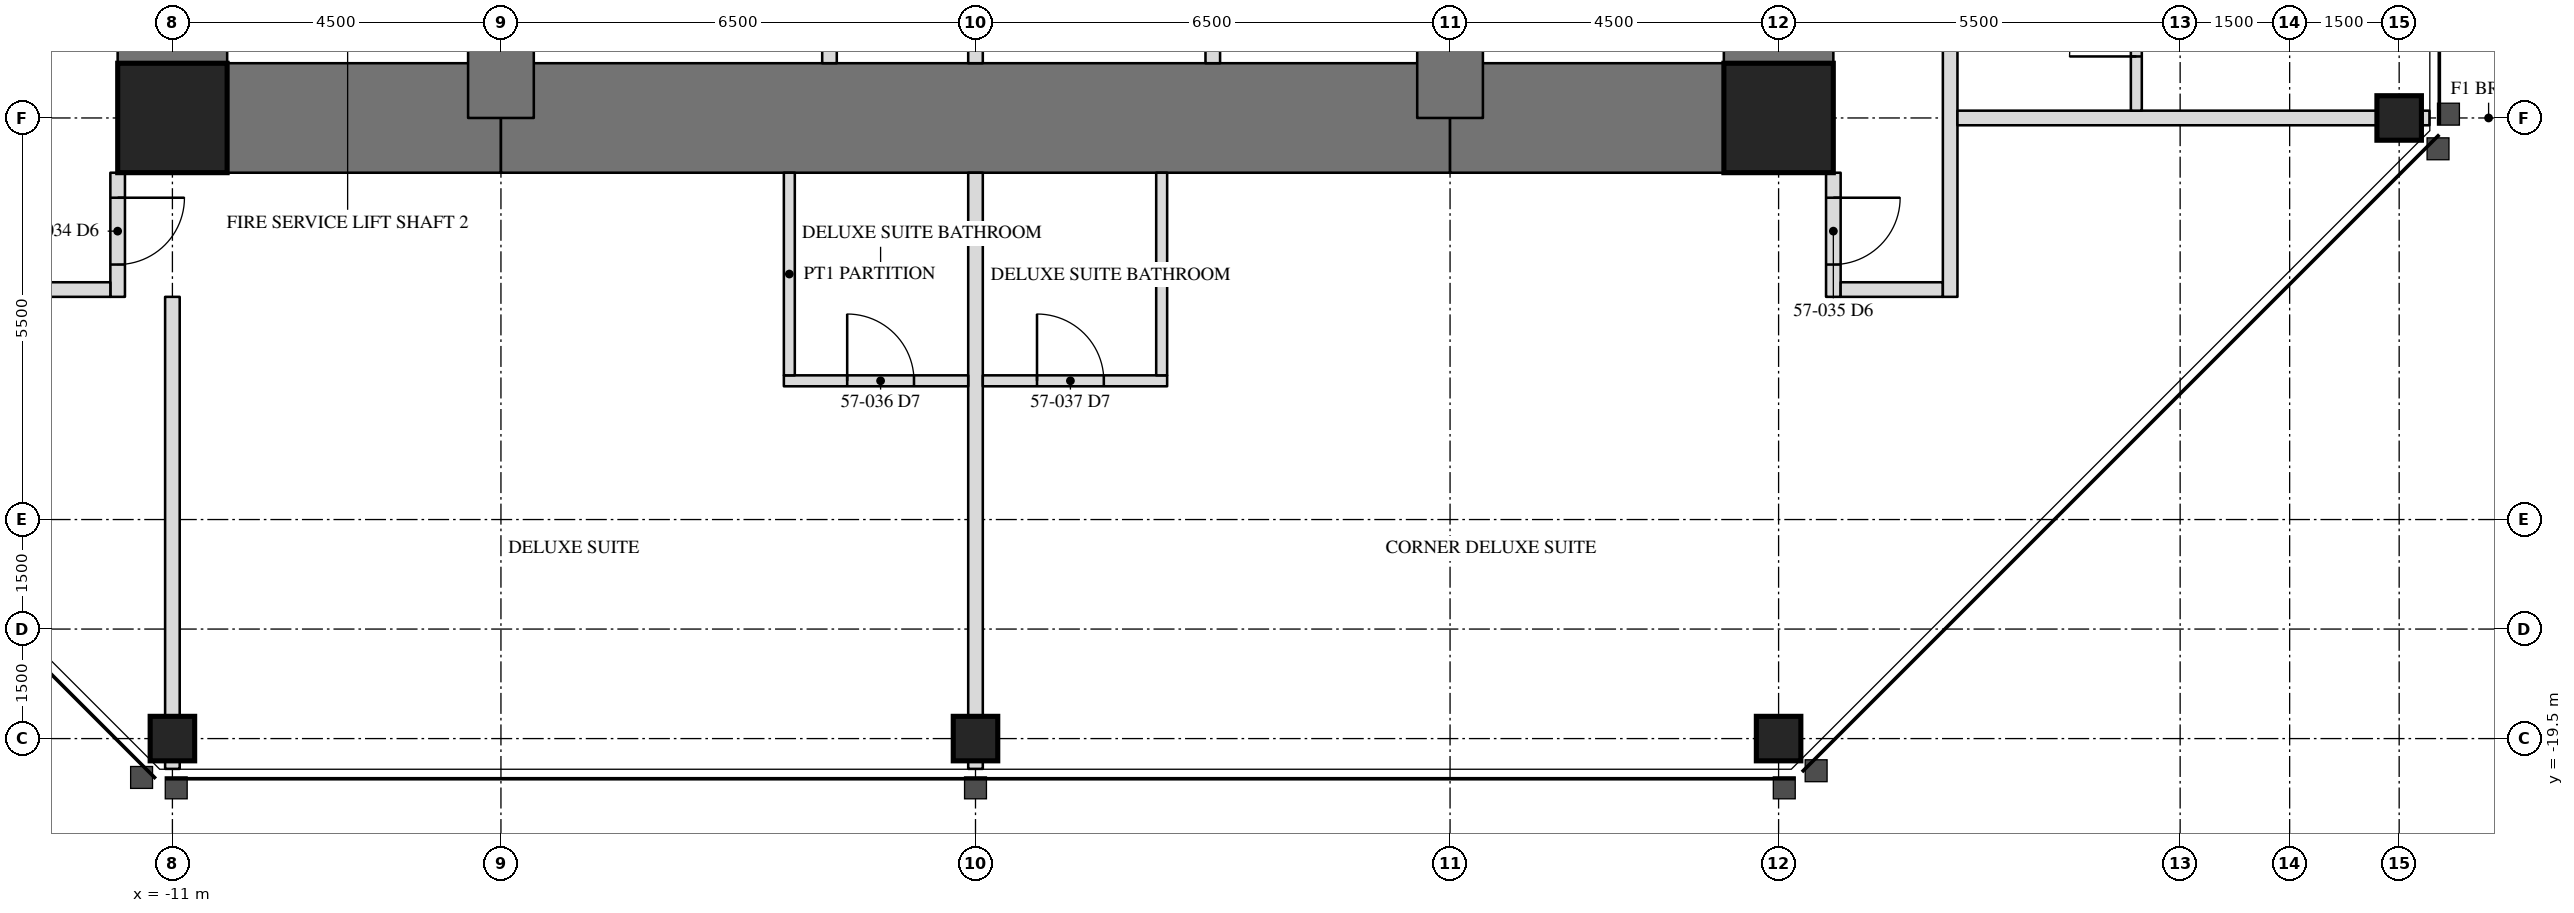
"""IFC4 building model, lengths in metres.
Left out: names, types, materials, properties, quantities, classifications, styles, units other than length and angle.
Written with IfcOpenShell. Run it as: python <this file> out.ifc"""

import sys

from ifc_helpers import new_model, si_unit, direction, frame, frame_2d, origin, origin_2d, place, context, subcontext, project, spatial, rectangle, hollow_rectangle, extrude, element, fill, save


model = new_model("IFC4")
c1 = context("Model", 3, precision=1e-05, world=origin(), true_north=direction((0.0, 1.0)))
c2 = subcontext(c1, "Body", "Model", "MODEL_VIEW")
j1 = project(units=[si_unit("LENGTHUNIT", "METRE"), si_unit("PLANEANGLEUNIT", "RADIAN")], contexts=[c1])
p1 = place(None, origin())
s1 = spatial("IfcSite", under=j1, at=p1, CompositionType="ELEMENT")
p2 = place(p1, origin())
s2 = spatial("IfcBuilding", under=s1, at=p2, CompositionType="ELEMENT")
p3 = place(p2, frame((0.0, 0.0, 236.2)))
s3 = spatial("IfcBuildingStorey", under=s2, at=p3, CompositionType="ELEMENT", Elevation=236.2)
for number, where, z_axis, x_axis in (
    (1, (-11.0, -19.5, 0.0), (0.0, 0.0, 1.0), (1.0, 0.0, 0.0)),
    (2, (0.0, -19.5, 0.0), (0.0, 0.0, 1.0), (1.0, 0.0, 0.0)),
    (3, (11.0, -19.5, 0.0), (0.0, 0.0, 1.0), (1.0, 0.0, 0.0)),
    (4, (19.5, -11.0, 0.0), (0.0, 0.0, 1.0), (0.0, 1.0, 0.0)),
):
    element("IfcColumn", number, at=place(p3, frame(where, z_axis=z_axis, x_axis=x_axis)), inside=s3, PredefinedType="COLUMN", context=c2, shape_type="SweptSolid", body=[
        extrude(hollow_rectangle(XDim=0.61, YDim=0.61, WallThickness=0.051, at=origin_2d()), origin(), (0.0, 0.0, 1.0), 3.5),
    ])
p4 = place(p3, frame((11.0, -11.0, 0.0), z_axis=(0.0, 0.0, 1.0), x_axis=(0.0, 1.0, 0.0)))
e5 = element("IfcWall", 5, at=p4, inside=s3, PredefinedType="SHEAR", context=c2, shape_type="SweptSolid", body=[
    extrude(rectangle(XDim=22.0, YDim=1.5, at=frame_2d((11.0, 0.0))), origin(), (0.0, 0.0, 1.0), 3.5),
])
p5 = place(p4, frame((15.393, 0.0, 0.0)))
e6 = element("IfcOpeningElement", 6, at=p5, cuts=e5, PredefinedType="OPENING", context=c2, shape_type="SweptSolid", body=[
    extrude(rectangle(XDim=0.915, YDim=2.134, at=frame_2d((0.458, 1.067))), frame((0.0, 0.76, 0.0), z_axis=(0.0, -1.0, 0.0), x_axis=(1.0, 0.0, 0.0)), (0.0, 0.0, 1.0), 1.52),
])
p6 = place(p3, frame((-11.0, 11.0, 0.0), z_axis=(0.0, 0.0, 1.0), x_axis=(0.0, -1.0, 0.0)))
e7 = element("IfcWall", 7, at=p6, inside=s3, PredefinedType="SHEAR", context=c2, shape_type="SweptSolid", body=[
    extrude(rectangle(XDim=22.0, YDim=1.5, at=frame_2d((11.0, 0.0))), origin(), (0.0, 0.0, 1.0), 3.5),
])
p7 = place(p6, frame((15.393, 0.0, 0.0)))
e8 = element("IfcOpeningElement", 8, at=p7, cuts=e7, PredefinedType="OPENING", context=c2, shape_type="SweptSolid", body=[
    extrude(rectangle(XDim=0.915, YDim=2.134, at=frame_2d((0.458, 1.067))), frame((0.0, 0.76, 0.0), z_axis=(0.0, -1.0, 0.0), x_axis=(1.0, 0.0, 0.0)), (0.0, 0.0, 1.0), 1.52),
])
p8 = place(p3, frame((-11.0, -11.0, 0.0), z_axis=(0.0, 0.0, 1.0), x_axis=(1.0, 0.0, 0.0)))
e9 = element("IfcWall", 9, at=p8, inside=s3, PredefinedType="SHEAR", context=c2, shape_type="SweptSolid", body=[
    extrude(rectangle(XDim=4.5, YDim=1.5, at=frame_2d((2.25, 0.0))), origin(), (0.0, 0.0, 1.0), 3.5),
])
p9 = place(p3, frame((-6.5, -11.0, 0.0), z_axis=(0.0, 0.0, 1.0), x_axis=(1.0, 0.0, 0.0)))
e10 = element("IfcWall", 10, at=p9, inside=s3, PredefinedType="SHEAR", context=c2, shape_type="SweptSolid", body=[
    extrude(rectangle(XDim=13.0, YDim=1.5, at=frame_2d((6.5, 0.0))), origin(), (0.0, 0.0, 1.0), 3.5),
])
p10 = place(p3, frame((6.5, -11.0, 0.0), z_axis=(0.0, 0.0, 1.0), x_axis=(1.0, 0.0, 0.0)))
e11 = element("IfcWall", 11, at=p10, inside=s3, PredefinedType="SHEAR", context=c2, shape_type="SweptSolid", body=[
    extrude(rectangle(XDim=4.5, YDim=1.5, at=frame_2d((2.25, 0.0))), origin(), (0.0, 0.0, 1.0), 3.5),
])
for number, where, z_axis, x_axis in (
    (12, (6.5, -11.0, 0.0), (0.0, 0.0, 1.0), (0.0, 1.0, 0.0)),
    (13, (-6.5, -6.5, 0.0), (0.0, 0.0, 1.0), (0.0, -1.0, 0.0)),
):
    element("IfcWall", number, at=place(p3, frame(where, z_axis=z_axis, x_axis=x_axis)), inside=s3, PredefinedType="SHEAR", context=c2, shape_type="SweptSolid", body=[
        extrude(rectangle(XDim=4.5, YDim=0.9, at=frame_2d((2.25, 0.0))), origin(), (0.0, 0.0, 1.0), 3.5),
    ])
for number, where, z_axis, x_axis in (
    (14, (-11.0, -11.0, 0.0), (0.0, 0.0, 1.0), (1.0, 0.0, 0.0)),
    (15, (11.0, -11.0, 0.0), (0.0, 0.0, 1.0), (1.0, 0.0, 0.0)),
):
    element("IfcColumn", number, at=place(p3, frame(where, z_axis=z_axis, x_axis=x_axis)), inside=s3, PredefinedType="COLUMN", context=c2, shape_type="SweptSolid", body=[
        extrude(hollow_rectangle(XDim=1.499, YDim=1.499, WallThickness=0.102, at=origin_2d()), origin(), (0.0, 0.0, 1.0), 3.5),
    ])
for number, where, z_axis, x_axis in (
    (16, (0.0, -10.25, 0.0), (0.0, 0.0, 1.0), (0.0, 1.0, 0.0)),
    (17, (3.25, -10.25, 0.0), (0.0, 0.0, 1.0), (0.0, 1.0, 0.0)),
    (18, (-2.0, -10.25, 0.0), (0.0, 0.0, 1.0), (0.0, 1.0, 0.0)),
):
    element("IfcWall", number, at=place(p3, frame(where, z_axis=z_axis, x_axis=x_axis)), inside=s3, PredefinedType="PARTITIONING", context=c2, shape_type="SweptSolid", body=[
        extrude(rectangle(XDim=3.3, YDim=0.2, at=frame_2d((1.65, 0.0))), origin(), (0.0, 0.0, 1.0), 3.31),
    ])
p11 = place(p3, frame((-11.75, -11.75, 0.0), z_axis=(0.0, 0.0, 1.0), x_axis=(0.0, -1.0, 0.0)))
e19 = element("IfcWall", 19, at=p11, inside=s3, PredefinedType="PARTITIONING", context=c2, shape_type="SweptSolid", body=[
    extrude(rectangle(XDim=1.7, YDim=0.2, at=frame_2d((0.85, 0.0))), origin(), (0.0, 0.0, 1.0), 3.31),
])
p12 = place(p11, frame((0.343, 0.0, 0.0)))
e20 = element("IfcOpeningElement", 20, at=p12, cuts=e19, PredefinedType="OPENING", context=c2, shape_type="SweptSolid", body=[
    extrude(rectangle(XDim=0.915, YDim=2.134, at=frame_2d((0.458, 1.067))), frame((0.0, 0.11, 0.0), z_axis=(0.0, -1.0, 0.0), x_axis=(1.0, 0.0, 0.0)), (0.0, 0.0, 1.0), 0.22),
])
p13 = place(p3, frame((11.75, -11.75, 0.0), z_axis=(0.0, 0.0, 1.0), x_axis=(0.0, -1.0, 0.0)))
e21 = element("IfcWall", 21, at=p13, inside=s3, PredefinedType="PARTITIONING", context=c2, shape_type="SweptSolid", body=[
    extrude(rectangle(XDim=1.7, YDim=0.2, at=frame_2d((0.85, 0.0))), origin(), (0.0, 0.0, 1.0), 3.31),
])
p14 = place(p13, frame((0.343, 0.0, 0.0)))
e22 = element("IfcOpeningElement", 22, at=p14, cuts=e21, PredefinedType="OPENING", context=c2, shape_type="SweptSolid", body=[
    extrude(rectangle(XDim=0.915, YDim=2.134, at=frame_2d((0.458, 1.067))), frame((0.0, 0.11, 0.0), z_axis=(0.0, -1.0, 0.0), x_axis=(1.0, 0.0, 0.0)), (0.0, 0.0, 1.0), 0.22),
])
p15 = place(p3, frame((-13.45, -13.35, 0.0), z_axis=(0.0, 0.0, 1.0), x_axis=(1.0, 0.0, 0.0)))
e23 = element("IfcWall", 23, at=p15, inside=s3, PredefinedType="PARTITIONING", context=c2, shape_type="SweptSolid", body=[
    extrude(rectangle(XDim=1.6, YDim=0.2, at=frame_2d((0.8, 0.0))), origin(), (0.0, 0.0, 1.0), 3.31),
])
p16 = place(p3, frame((11.85, -13.35, 0.0), z_axis=(0.0, 0.0, 1.0), x_axis=(1.0, 0.0, 0.0)))
e24 = element("IfcWall", 24, at=p16, inside=s3, PredefinedType="PARTITIONING", context=c2, shape_type="SweptSolid", body=[
    extrude(rectangle(XDim=1.4, YDim=0.2, at=frame_2d((0.7, 0.0))), origin(), (0.0, 0.0, 1.0), 3.31),
])
p17 = place(p3, frame((13.35, -13.45, 0.0), z_axis=(0.0, 0.0, 1.0), x_axis=(0.0, 1.0, 0.0)))
e25 = element("IfcWall", 25, at=p17, inside=s3, PredefinedType="PARTITIONING", context=c2, shape_type="SweptSolid", body=[
    extrude(rectangle(XDim=27.5, YDim=0.2, at=frame_2d((13.75, 0.0))), origin(), (0.0, 0.0, 1.0), 3.31),
])
p18 = place(p17, frame((5.353, 0.0, 0.0)))
e26 = element("IfcOpeningElement", 26, at=p18, cuts=e25, PredefinedType="OPENING", context=c2, shape_type="SweptSolid", body=[
    extrude(rectangle(XDim=0.915, YDim=2.134, at=frame_2d((0.458, 1.067))), frame((0.0, 0.11, 0.0), z_axis=(0.0, -1.0, 0.0), x_axis=(1.0, 0.0, 0.0)), (0.0, 0.0, 1.0), 0.22),
])
p19 = place(p17, frame((13.577, 0.0, 0.0)))
e27 = element("IfcOpeningElement", 27, at=p19, cuts=e25, PredefinedType="OPENING", context=c2, shape_type="SweptSolid", body=[
    extrude(rectangle(XDim=0.915, YDim=2.134, at=frame_2d((0.458, 1.067))), frame((0.0, 0.11, 0.0), z_axis=(0.0, -1.0, 0.0), x_axis=(1.0, 0.0, 0.0)), (0.0, 0.0, 1.0), 0.22),
])
p20 = place(p17, frame((21.967, 0.0, 0.0)))
e28 = element("IfcOpeningElement", 28, at=p20, cuts=e25, PredefinedType="OPENING", context=c2, shape_type="SweptSolid", body=[
    extrude(rectangle(XDim=0.915, YDim=2.134, at=frame_2d((0.458, 1.067))), frame((0.0, 0.11, 0.0), z_axis=(0.0, -1.0, 0.0), x_axis=(1.0, 0.0, 0.0)), (0.0, 0.0, 1.0), 0.22),
])
p21 = place(p3, frame((13.45, -11.0, 0.0), z_axis=(0.0, 0.0, 1.0), x_axis=(1.0, 0.0, 0.0)))
e29 = element("IfcWall", 29, at=p21, inside=s3, PredefinedType="PARTITIONING", context=c2, shape_type="SweptSolid", body=[
    extrude(rectangle(XDim=6.465, YDim=0.2, at=frame_2d((3.232, 0.0))), origin(), (0.0, 0.0, 1.0), 2.802),
])
p22 = place(p3, frame((15.9, -10.9, 0.0), z_axis=(0.0, 0.0, 1.0), x_axis=(0.0, 1.0, 0.0)))
e30 = element("IfcWall", 30, at=p22, inside=s3, PredefinedType="PARTITIONING", context=c2, shape_type="SweptSolid", body=[
    extrude(rectangle(XDim=2.525, YDim=0.15, at=frame_2d((1.262, 0.0))), origin(), (0.0, 0.0, 1.0), 3.31),
])
p23 = place(p22, frame((0.742, 0.0, 0.0)))
e31 = element("IfcOpeningElement", 31, at=p23, cuts=e30, PredefinedType="OPENING", context=c2, shape_type="SweptSolid", body=[
    extrude(rectangle(XDim=0.915, YDim=2.032, at=frame_2d((0.458, 1.016))), frame((0.0, 0.085, 0.0), z_axis=(0.0, -1.0, 0.0), x_axis=(1.0, 0.0, 0.0)), (0.0, 0.0, 1.0), 0.17),
])
p24 = place(p3, frame((-11.0, -13.45, 0.0), z_axis=(0.0, 0.0, 1.0), x_axis=(0.0, -1.0, 0.0)))
e32 = element("IfcWall", 32, at=p24, inside=s3, PredefinedType="PARTITIONING", context=c2, shape_type="SweptSolid", body=[
    extrude(rectangle(XDim=6.465, YDim=0.2, at=frame_2d((3.232, 0.0))), origin(), (0.0, 0.0, 1.0), 2.802),
])
p25 = place(p3, frame((0.0, -11.75, 0.0), z_axis=(0.0, 0.0, 1.0), x_axis=(0.0, -1.0, 0.0)))
e33 = element("IfcWall", 33, at=p25, inside=s3, PredefinedType="PARTITIONING", context=c2, shape_type="SweptSolid", body=[
    extrude(rectangle(XDim=8.165, YDim=0.2, at=frame_2d((4.083, 0.0))), origin(), (0.0, 0.0, 1.0), 2.802),
])
p26 = place(p3, frame((-2.625, -14.6, 0.0), z_axis=(0.0, 0.0, 1.0), x_axis=(1.0, 0.0, 0.0)))
e34 = element("IfcWall", 34, at=p26, inside=s3, PredefinedType="PARTITIONING", context=c2, shape_type="SweptSolid", body=[
    extrude(rectangle(XDim=2.525, YDim=0.15, at=frame_2d((1.262, 0.0))), origin(), (0.0, 0.0, 1.0), 3.31),
])
p27 = place(p26, frame((0.867, 0.0, 0.0)))
e35 = element("IfcOpeningElement", 35, at=p27, cuts=e34, PredefinedType="OPENING", context=c2, shape_type="SweptSolid", body=[
    extrude(rectangle(XDim=0.915, YDim=2.032, at=frame_2d((0.458, 1.016))), frame((0.0, 0.085, 0.0), z_axis=(0.0, -1.0, 0.0), x_axis=(1.0, 0.0, 0.0)), (0.0, 0.0, 1.0), 0.17),
])
p28 = place(p3, frame((-2.55, -11.75, 0.0), z_axis=(0.0, 0.0, 1.0), x_axis=(0.0, -1.0, 0.0)))
e36 = element("IfcWall", 36, at=p28, inside=s3, PredefinedType="PARTITIONING", context=c2, shape_type="SweptSolid", body=[
    extrude(rectangle(XDim=2.775, YDim=0.15, at=frame_2d((1.387, 0.0))), origin(), (0.0, 0.0, 1.0), 3.31),
])
p29 = place(p3, frame((0.1, -14.6, 0.0), z_axis=(0.0, 0.0, 1.0), x_axis=(1.0, 0.0, 0.0)))
e37 = element("IfcWall", 37, at=p29, inside=s3, PredefinedType="PARTITIONING", context=c2, shape_type="SweptSolid", body=[
    extrude(rectangle(XDim=2.525, YDim=0.15, at=frame_2d((1.262, 0.0))), origin(), (0.0, 0.0, 1.0), 3.31),
])
p30 = place(p29, frame((0.742, 0.0, 0.0)))
e38 = element("IfcOpeningElement", 38, at=p30, cuts=e37, PredefinedType="OPENING", context=c2, shape_type="SweptSolid", body=[
    extrude(rectangle(XDim=0.915, YDim=2.032, at=frame_2d((0.458, 1.016))), frame((0.0, 0.085, 0.0), z_axis=(0.0, -1.0, 0.0), x_axis=(1.0, 0.0, 0.0)), (0.0, 0.0, 1.0), 0.17),
])
p31 = place(p3, frame((2.55, -11.75, 0.0), z_axis=(0.0, 0.0, 1.0), x_axis=(0.0, -1.0, 0.0)))
e39 = element("IfcWall", 39, at=p31, inside=s3, PredefinedType="PARTITIONING", context=c2, shape_type="SweptSolid", body=[
    extrude(rectangle(XDim=2.775, YDim=0.15, at=frame_2d((1.387, 0.0))), origin(), (0.0, 0.0, 1.0), 3.31),
])
p32 = place(p23, origin())
e40 = element("IfcDoor", 40, at=p32, inside=s3, OperationType="SINGLE_SWING_LEFT", PredefinedType="DOOR", context=c2, shape_type="SweptSolid", body=[
    extrude(rectangle(XDim=0.915, YDim=2.032, at=frame_2d((0.458, 1.016))), frame((0.0, 0.025, 0.0), z_axis=(0.0, -1.0, 0.0), x_axis=(1.0, 0.0, 0.0)), (0.0, 0.0, 1.0), 0.05),
])
fill(e31, e40)
p33 = place(p12, origin())
e41 = element("IfcDoor", 41, at=p33, inside=s3, OperationType="SINGLE_SWING_LEFT", PredefinedType="DOOR", context=c2, shape_type="SweptSolid", body=[
    extrude(rectangle(XDim=0.915, YDim=2.134, at=frame_2d((0.458, 1.067))), frame((0.0, 0.025, 0.0), z_axis=(0.0, -1.0, 0.0), x_axis=(1.0, 0.0, 0.0)), (0.0, 0.0, 1.0), 0.05),
])
fill(e20, e41)
p34 = place(p14, origin())
e42 = element("IfcDoor", 42, at=p34, inside=s3, OperationType="SINGLE_SWING_LEFT", PredefinedType="DOOR", context=c2, shape_type="SweptSolid", body=[
    extrude(rectangle(XDim=0.915, YDim=2.134, at=frame_2d((0.458, 1.067))), frame((0.0, 0.025, 0.0), z_axis=(0.0, -1.0, 0.0), x_axis=(1.0, 0.0, 0.0)), (0.0, 0.0, 1.0), 0.05),
])
fill(e22, e42)
p35 = place(p27, origin())
e43 = element("IfcDoor", 43, at=p35, inside=s3, OperationType="SINGLE_SWING_LEFT", PredefinedType="DOOR", context=c2, shape_type="SweptSolid", body=[
    extrude(rectangle(XDim=0.915, YDim=2.032, at=frame_2d((0.458, 1.016))), frame((0.0, 0.025, 0.0), z_axis=(0.0, -1.0, 0.0), x_axis=(1.0, 0.0, 0.0)), (0.0, 0.0, 1.0), 0.05),
])
fill(e35, e43)
p36 = place(p30, origin())
e44 = element("IfcDoor", 44, at=p36, inside=s3, OperationType="SINGLE_SWING_LEFT", PredefinedType="DOOR", context=c2, shape_type="SweptSolid", body=[
    extrude(rectangle(XDim=0.915, YDim=2.032, at=frame_2d((0.458, 1.016))), frame((0.0, 0.025, 0.0), z_axis=(0.0, -1.0, 0.0), x_axis=(1.0, 0.0, 0.0)), (0.0, 0.0, 1.0), 0.05),
])
fill(e38, e44)
save(model, sys.argv[1])
